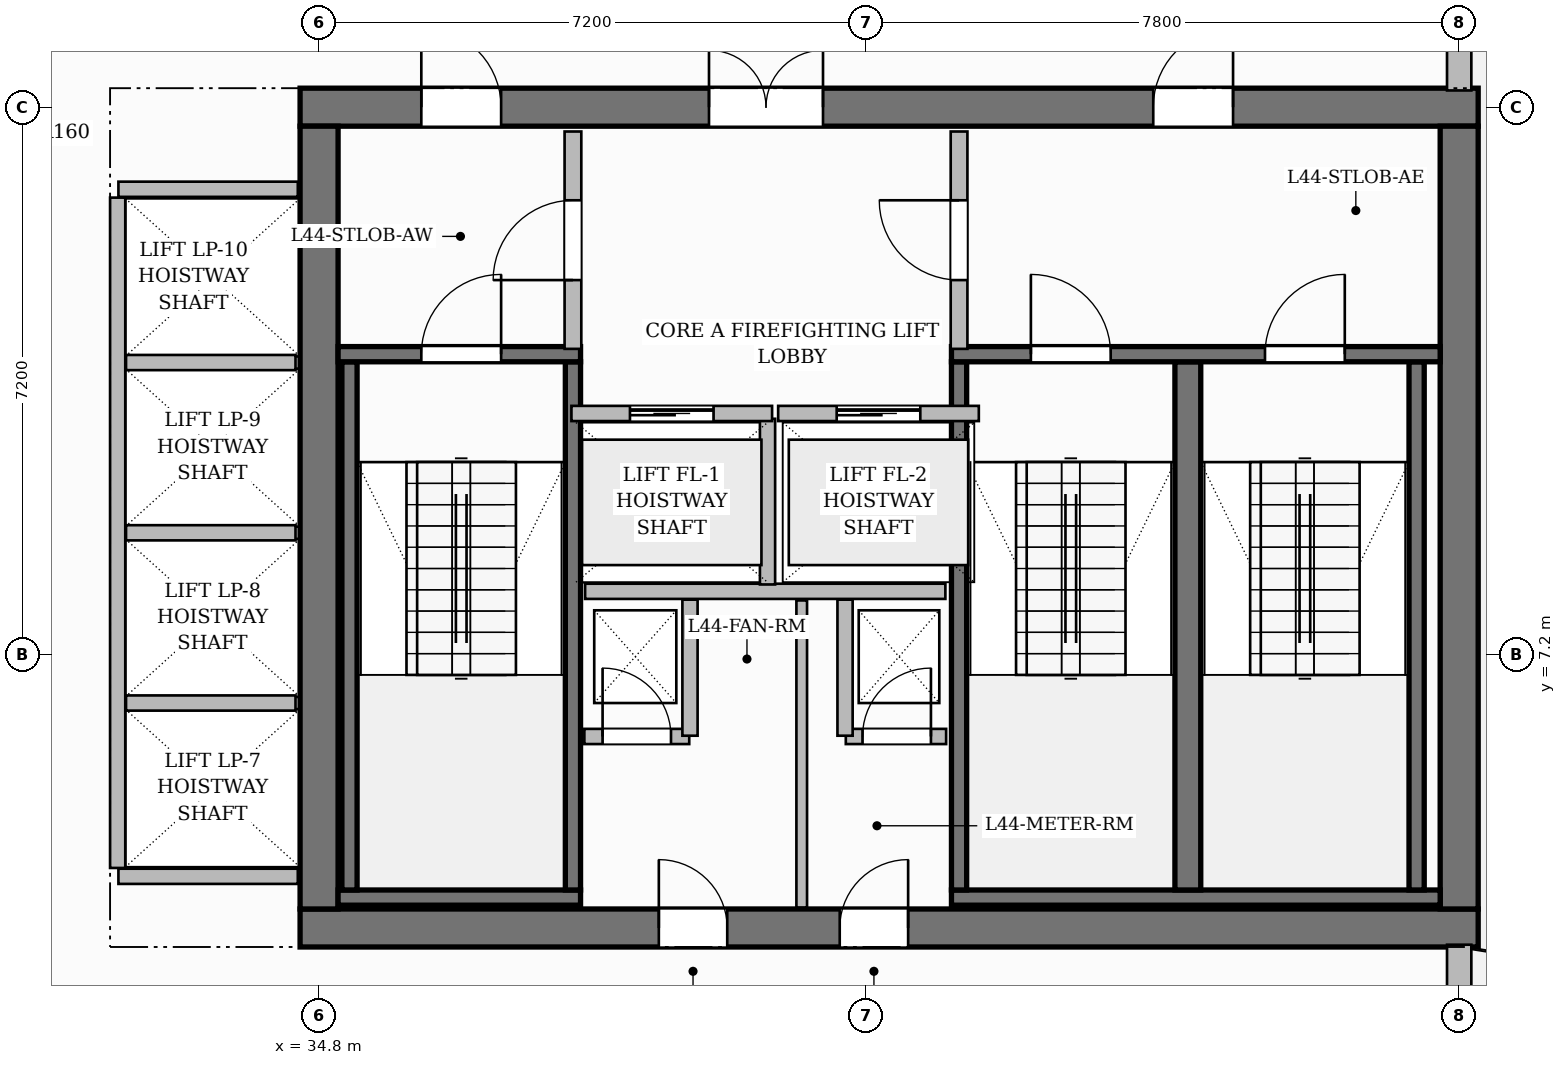
"""IFC4 building model, lengths in metres.
Left out: names, types, materials, properties, quantities, classifications, styles, units other than length and angle.
Written with IfcOpenShell. Run it as: python <this file> out.ifc"""

import sys

from ifc_helpers import new_model, si_unit, direction, frame, frame_2d, origin, place, context, subcontext, project, spatial, rectangle, extrude, source, transform, mapped, element, fill, save


model = new_model("IFC4")
c1 = context("Model", 3, precision=1e-05, world=origin(), true_north=direction((0.0, 1.0)))
c2 = subcontext(c1, "Body", "Model", "MODEL_VIEW")
j1 = project(units=[si_unit("LENGTHUNIT", "METRE"), si_unit("PLANEANGLEUNIT", "RADIAN")], contexts=[c1])
p1 = place(None, origin())
s1 = spatial("IfcSite", under=j1, at=p1, CompositionType="ELEMENT")
p2 = place(p1, origin())
s2 = spatial("IfcBuilding", under=s1, at=p2, CompositionType="ELEMENT")
p3 = place(p2, frame((0.0, 0.0, 177.25)))
s3 = spatial("IfcBuildingStorey", under=s2, at=p3, CompositionType="ELEMENT", Elevation=177.25)
p4 = place(p3, frame((34.55, 3.6, 0.0), z_axis=(0.0, 0.0, 1.0), x_axis=(1.0, 0.0, 0.0)))
e1 = element("IfcWall", 1, at=p4, inside=s3, PredefinedType="SHEAR", context=c2, shape_type="SweptSolid", body=[
    extrude(rectangle(XDim=15.5, YDim=0.5, at=frame_2d((7.75, 0.0))), origin(), (0.0, 0.0, 1.0), 3.85),
])
p5 = place(p4, frame((4.72, 0.0, 0.0)))
e2 = element("IfcOpeningElement", 2, at=p5, cuts=e1, PredefinedType="OPENING", context=c2, shape_type="SweptSolid", body=[
    extrude(rectangle(XDim=0.9, YDim=2.1, at=frame_2d((0.45, 1.05))), frame((0.0, 0.26, 0.0), z_axis=(0.0, -1.0, 0.0), x_axis=(1.0, 0.0, 0.0)), (0.0, 0.0, 1.0), 0.52),
])
p6 = place(p4, frame((7.1, 0.0, 0.0)))
e3 = element("IfcOpeningElement", 3, at=p6, cuts=e1, PredefinedType="OPENING", context=c2, shape_type="SweptSolid", body=[
    extrude(rectangle(XDim=0.9, YDim=2.1, at=frame_2d((0.45, 1.05))), frame((0.0, 0.26, 0.0), z_axis=(0.0, -1.0, 0.0), x_axis=(1.0, 0.0, 0.0)), (0.0, 0.0, 1.0), 0.52),
])
p7 = place(p3, frame((34.55, 14.4, 0.0), z_axis=(0.0, 0.0, 1.0), x_axis=(1.0, 0.0, 0.0)))
e4 = element("IfcWall", 4, at=p7, inside=s3, PredefinedType="SHEAR", context=c2, shape_type="SweptSolid", body=[
    extrude(rectangle(XDim=15.5, YDim=0.5, at=frame_2d((7.75, 0.0))), origin(), (0.0, 0.0, 1.0), 3.85),
])
p8 = place(p7, frame((5.38, 0.0, 0.0)))
e5 = element("IfcOpeningElement", 5, at=p8, cuts=e4, PredefinedType="OPENING", context=c2, shape_type="SweptSolid", body=[
    extrude(rectangle(XDim=1.5, YDim=2.2, at=frame_2d((0.75, 1.1))), frame((0.0, 0.26, 0.0), z_axis=(0.0, -1.0, 0.0), x_axis=(1.0, 0.0, 0.0)), (0.0, 0.0, 1.0), 0.52),
])
p9 = place(p7, frame((1.595, 0.0, 0.0)))
e6 = element("IfcOpeningElement", 6, at=p9, cuts=e4, PredefinedType="OPENING", context=c2, shape_type="SweptSolid", body=[
    extrude(rectangle(XDim=1.05, YDim=2.15, at=frame_2d((0.525, 1.075))), frame((0.0, 0.26, 0.0), z_axis=(0.0, -1.0, 0.0), x_axis=(1.0, 0.0, 0.0)), (0.0, 0.0, 1.0), 0.52),
])
p10 = place(p7, frame((11.225, 0.0, 0.0)))
e7 = element("IfcOpeningElement", 7, at=p10, cuts=e4, PredefinedType="OPENING", context=c2, shape_type="SweptSolid", body=[
    extrude(rectangle(XDim=1.05, YDim=2.15, at=frame_2d((0.525, 1.075))), frame((0.0, 0.26, 0.0), z_axis=(0.0, -1.0, 0.0), x_axis=(1.0, 0.0, 0.0)), (0.0, 0.0, 1.0), 0.52),
])
for number, where, z_axis, x_axis in (
    (8, (34.8, 3.85, 0.0), (0.0, 0.0, 1.0), (0.0, 1.0, 0.0)),
    (9, (49.8, 3.85, 0.0), (0.0, 0.0, 1.0), (0.0, 1.0, 0.0)),
):
    element("IfcWall", number, at=place(p3, frame(where, z_axis=z_axis, x_axis=x_axis)), inside=s3, PredefinedType="SHEAR", context=c2, shape_type="SweptSolid", body=[
        extrude(rectangle(XDim=10.3, YDim=0.5, at=frame_2d((5.15, 0.0))), origin(), (0.0, 0.0, 1.0), 3.85),
    ])
p11 = place(p3, frame((35.05, 4.0, 0.0), z_axis=(0.0, 0.0, 1.0), x_axis=(1.0, 0.0, 0.0)))
e10 = element("IfcWall", 10, at=p11, inside=s3, PredefinedType="SHEAR", context=c2, shape_type="SweptSolid", body=[
    extrude(rectangle(XDim=3.19, YDim=0.2, at=frame_2d((1.595, 0.0))), origin(), (0.0, 0.0, 1.0), 3.85),
])
for number, where, z_axis, x_axis in (
    (11, (35.2, 4.1, 0.0), (0.0, 0.0, 1.0), (0.0, 1.0, 0.0)),
    (12, (38.14, 4.1, 0.0), (0.0, 0.0, 1.0), (0.0, 1.0, 0.0)),
):
    element("IfcWall", number, at=place(p3, frame(where, z_axis=z_axis, x_axis=x_axis)), inside=s3, PredefinedType="SHEAR", context=c2, shape_type="SweptSolid", body=[
        extrude(rectangle(XDim=6.95, YDim=0.2, at=frame_2d((3.475, 0.0))), origin(), (0.0, 0.0, 1.0), 3.85),
    ])
p12 = place(p3, frame((35.05, 11.15, 0.0), z_axis=(0.0, 0.0, 1.0), x_axis=(1.0, 0.0, 0.0)))
e13 = element("IfcWall", 13, at=p12, inside=s3, PredefinedType="SHEAR", context=c2, shape_type="SweptSolid", body=[
    extrude(rectangle(XDim=3.19, YDim=0.2, at=frame_2d((1.595, 0.0))), origin(), (0.0, 0.0, 1.0), 3.85),
])
p13 = place(p12, frame((1.095, 0.0, 0.0)))
e14 = element("IfcOpeningElement", 14, at=p13, cuts=e13, PredefinedType="OPENING", context=c2, shape_type="SweptSolid", body=[
    extrude(rectangle(XDim=1.05, YDim=2.2, at=frame_2d((0.525, 1.1))), frame((0.0, 0.11, 0.0), z_axis=(0.0, -1.0, 0.0), x_axis=(1.0, 0.0, 0.0)), (0.0, 0.0, 1.0), 0.22),
])
p14 = place(p3, frame((43.12, 4.0, 0.0), z_axis=(0.0, 0.0, 1.0), x_axis=(1.0, 0.0, 0.0)))
e15 = element("IfcWall", 15, at=p14, inside=s3, PredefinedType="SHEAR", context=c2, shape_type="SweptSolid", body=[
    extrude(rectangle(XDim=6.43, YDim=0.2, at=frame_2d((3.215, 0.0))), origin(), (0.0, 0.0, 1.0), 3.85),
])
p15 = place(p3, frame((43.22, 4.1, 0.0), z_axis=(0.0, 0.0, 1.0), x_axis=(0.0, 1.0, 0.0)))
e16 = element("IfcWall", 16, at=p15, inside=s3, PredefinedType="SHEAR", context=c2, shape_type="SweptSolid", body=[
    extrude(rectangle(XDim=6.95, YDim=0.2, at=frame_2d((3.475, 0.0))), origin(), (0.0, 0.0, 1.0), 3.85),
])
p16 = place(p3, frame((46.23, 4.1, 0.0), z_axis=(0.0, 0.0, 1.0), x_axis=(0.0, 1.0, 0.0)))
e17 = element("IfcWall", 17, at=p16, inside=s3, PredefinedType="SHEAR", context=c2, shape_type="SweptSolid", body=[
    extrude(rectangle(XDim=6.95, YDim=0.34, at=frame_2d((3.475, 0.0))), origin(), (0.0, 0.0, 1.0), 3.85),
])
p17 = place(p3, frame((49.24, 4.1, 0.0), z_axis=(0.0, 0.0, 1.0), x_axis=(0.0, 1.0, 0.0)))
e18 = element("IfcWall", 18, at=p17, inside=s3, PredefinedType="SHEAR", context=c2, shape_type="SweptSolid", body=[
    extrude(rectangle(XDim=6.95, YDim=0.2, at=frame_2d((3.475, 0.0))), origin(), (0.0, 0.0, 1.0), 3.85),
])
p18 = place(p3, frame((43.12, 11.15, 0.0), z_axis=(0.0, 0.0, 1.0), x_axis=(1.0, 0.0, 0.0)))
e19 = element("IfcWall", 19, at=p18, inside=s3, PredefinedType="SHEAR", context=c2, shape_type="SweptSolid", body=[
    extrude(rectangle(XDim=6.43, YDim=0.2, at=frame_2d((3.215, 0.0))), origin(), (0.0, 0.0, 1.0), 3.85),
])
p19 = place(p18, frame((1.045, 0.0, 0.0)))
e20 = element("IfcOpeningElement", 20, at=p19, cuts=e19, PredefinedType="OPENING", context=c2, shape_type="SweptSolid", body=[
    extrude(rectangle(XDim=1.05, YDim=2.2, at=frame_2d((0.525, 1.1))), frame((0.0, 0.11, 0.0), z_axis=(0.0, -1.0, 0.0), x_axis=(1.0, 0.0, 0.0)), (0.0, 0.0, 1.0), 0.22),
])
p20 = place(p18, frame((4.125, 0.0, 0.0)))
e21 = element("IfcOpeningElement", 21, at=p20, cuts=e19, PredefinedType="OPENING", context=c2, shape_type="SweptSolid", body=[
    extrude(rectangle(XDim=1.05, YDim=2.2, at=frame_2d((0.525, 1.1))), frame((0.0, 0.11, 0.0), z_axis=(0.0, -1.0, 0.0), x_axis=(1.0, 0.0, 0.0)), (0.0, 0.0, 1.0), 0.22),
])
p21 = place(p3, frame((38.3, 8.03, 0.0), z_axis=(0.0, 0.0, 1.0), x_axis=(1.0, 0.0, 0.0)))
e22 = element("IfcWall", 22, at=p21, inside=s3, PredefinedType="PARTITIONING", context=c2, shape_type="SweptSolid", body=[
    extrude(rectangle(XDim=4.74, YDim=0.2, at=frame_2d((2.37, 0.0))), origin(), (0.0, 0.0, 1.0), 3.6),
])
p22 = place(p3, frame((40.7, 8.12, 0.0), z_axis=(0.0, 0.0, 1.0), x_axis=(0.0, 1.0, 0.0)))
e23 = element("IfcWall", 23, at=p22, inside=s3, PredefinedType="PARTITIONING", context=c2, shape_type="SweptSolid", body=[
    extrude(rectangle(XDim=2.18, YDim=0.2, at=frame_2d((1.09, 0.0))), origin(), (0.0, 0.0, 1.0), 3.6),
])
p23 = place(p3, frame((38.14, 11.22, 0.0), z_axis=(0.0, 0.0, 1.0), x_axis=(0.0, 1.0, 0.0)))
e24 = element("IfcWall", 24, at=p23, inside=s3, PredefinedType="PARTITIONING", context=c2, shape_type="SweptSolid", body=[
    extrude(rectangle(XDim=2.86, YDim=0.22, at=frame_2d((1.43, 0.0))), origin(), (0.0, 0.0, 1.0), 3.6),
])
p24 = place(p23, frame((0.905, 0.0, 0.0)))
e25 = element("IfcOpeningElement", 25, at=p24, cuts=e24, PredefinedType="OPENING", context=c2, shape_type="SweptSolid", body=[
    extrude(rectangle(XDim=1.05, YDim=2.15, at=frame_2d((0.525, 1.075))), frame((0.0, 0.12, 0.0), z_axis=(0.0, -1.0, 0.0), x_axis=(1.0, 0.0, 0.0)), (0.0, 0.0, 1.0), 0.24),
])
p25 = place(p3, frame((43.22, 11.22, 0.0), z_axis=(0.0, 0.0, 1.0), x_axis=(0.0, 1.0, 0.0)))
e26 = element("IfcWall", 26, at=p25, inside=s3, PredefinedType="PARTITIONING", context=c2, shape_type="SweptSolid", body=[
    extrude(rectangle(XDim=2.86, YDim=0.22, at=frame_2d((1.43, 0.0))), origin(), (0.0, 0.0, 1.0), 3.6),
])
p26 = place(p25, frame((0.905, 0.0, 0.0)))
e27 = element("IfcOpeningElement", 27, at=p26, cuts=e26, PredefinedType="OPENING", context=c2, shape_type="SweptSolid", body=[
    extrude(rectangle(XDim=1.05, YDim=2.15, at=frame_2d((0.525, 1.075))), frame((0.0, 0.12, 0.0), z_axis=(0.0, -1.0, 0.0), x_axis=(1.0, 0.0, 0.0)), (0.0, 0.0, 1.0), 0.24),
])
p27 = place(p3, frame((38.29, 6.12, 0.0), z_axis=(0.0, 0.0, 1.0), x_axis=(1.0, 0.0, 0.0)))
e28 = element("IfcWall", 28, at=p27, inside=s3, PredefinedType="PARTITIONING", context=c2, shape_type="SweptSolid", body=[
    extrude(rectangle(XDim=1.38, YDim=0.2, at=frame_2d((0.69, 0.0))), origin(), (0.0, 0.0, 1.0), 3.6),
])
p28 = place(p27, frame((0.24, 0.0, 0.0)))
e29 = element("IfcOpeningElement", 29, at=p28, cuts=e28, PredefinedType="OPENING", context=c2, shape_type="SweptSolid", body=[
    extrude(rectangle(XDim=0.9, YDim=2.1, at=frame_2d((0.45, 1.05))), frame((0.0, 0.11, 0.0), z_axis=(0.0, -1.0, 0.0), x_axis=(1.0, 0.0, 0.0)), (0.0, 0.0, 1.0), 0.22),
])
p29 = place(p3, frame((39.68, 6.13, 0.0), z_axis=(0.0, 0.0, 1.0), x_axis=(0.0, 1.0, 0.0)))
e30 = element("IfcWall", 30, at=p29, inside=s3, PredefinedType="PARTITIONING", context=c2, shape_type="SweptSolid", body=[
    extrude(rectangle(XDim=1.79, YDim=0.2, at=frame_2d((0.895, 0.0))), origin(), (0.0, 0.0, 1.0), 3.6),
])
p30 = place(p3, frame((41.73, 6.12, 0.0), z_axis=(0.0, 0.0, 1.0), x_axis=(1.0, 0.0, 0.0)))
e31 = element("IfcWall", 31, at=p30, inside=s3, PredefinedType="PARTITIONING", context=c2, shape_type="SweptSolid", body=[
    extrude(rectangle(XDim=1.32, YDim=0.2, at=frame_2d((0.66, 0.0))), origin(), (0.0, 0.0, 1.0), 3.6),
])
p31 = place(p30, frame((0.22, 0.0, 0.0)))
e32 = element("IfcOpeningElement", 32, at=p31, cuts=e31, PredefinedType="OPENING", context=c2, shape_type="SweptSolid", body=[
    extrude(rectangle(XDim=0.9, YDim=2.1, at=frame_2d((0.45, 1.05))), frame((0.0, 0.11, 0.0), z_axis=(0.0, -1.0, 0.0), x_axis=(1.0, 0.0, 0.0)), (0.0, 0.0, 1.0), 0.22),
])
p32 = place(p3, frame((41.72, 6.13, 0.0), z_axis=(0.0, 0.0, 1.0), x_axis=(0.0, 1.0, 0.0)))
e33 = element("IfcWall", 33, at=p32, inside=s3, PredefinedType="PARTITIONING", context=c2, shape_type="SweptSolid", body=[
    extrude(rectangle(XDim=1.79, YDim=0.2, at=frame_2d((0.895, 0.0))), origin(), (0.0, 0.0, 1.0), 3.6),
])
p33 = place(p3, frame((41.15, 3.87, 0.0), z_axis=(0.0, 0.0, 1.0), x_axis=(0.0, 1.0, 0.0)))
e34 = element("IfcWall", 34, at=p33, inside=s3, PredefinedType="PARTITIONING", context=c2, shape_type="SweptSolid", body=[
    extrude(rectangle(XDim=4.04, YDim=0.14, at=frame_2d((2.02, 0.0))), origin(), (0.0, 0.0, 1.0), 3.6),
])
for number, where, z_axis, x_axis in (
    (35, (32.16, 4.28, 0.0), (0.0, 0.0, 1.0), (1.0, 0.0, 0.0)),
    (36, (32.16, 13.32, 0.0), (0.0, 0.0, 1.0), (1.0, 0.0, 0.0)),
):
    element("IfcWall", number, at=place(p3, frame(where, z_axis=z_axis, x_axis=x_axis)), inside=s3, PredefinedType="PARTITIONING", context=c2, shape_type="SweptSolid", body=[
        extrude(rectangle(XDim=2.36, YDim=0.2, at=frame_2d((1.18, 0.0))), origin(), (0.0, 0.0, 1.0), 3.6),
    ])
p34 = place(p3, frame((32.15, 4.39, 0.0), z_axis=(0.0, 0.0, 1.0), x_axis=(0.0, 1.0, 0.0)))
e37 = element("IfcWall", 37, at=p34, inside=s3, PredefinedType="PARTITIONING", context=c2, shape_type="SweptSolid", body=[
    extrude(rectangle(XDim=8.82, YDim=0.2, at=frame_2d((4.41, 0.0))), origin(), (0.0, 0.0, 1.0), 3.6),
])
for number, where, z_axis, x_axis in (
    (38, (32.26, 6.56, 0.0), (0.0, 0.0, 1.0), (1.0, 0.0, 0.0)),
    (39, (32.26, 8.8, 0.0), (0.0, 0.0, 1.0), (1.0, 0.0, 0.0)),
    (40, (32.26, 11.04, 0.0), (0.0, 0.0, 1.0), (1.0, 0.0, 0.0)),
):
    element("IfcWall", number, at=place(p3, frame(where, z_axis=z_axis, x_axis=x_axis)), inside=s3, PredefinedType="PARTITIONING", context=c2, shape_type="SweptSolid", body=[
        extrude(rectangle(XDim=2.23, YDim=0.2, at=frame_2d((1.115, 0.0))), origin(), (0.0, 0.0, 1.0), 3.6),
    ])
p35 = place(p3, frame((38.12, 10.37, 0.0), z_axis=(0.0, 0.0, 1.0), x_axis=(1.0, 0.0, 0.0)))
e41 = element("IfcWall", 41, at=p35, inside=s3, PredefinedType="PARTITIONING", context=c2, shape_type="SweptSolid", body=[
    extrude(rectangle(XDim=2.64, YDim=0.2, at=frame_2d((1.32, 0.0))), origin(), (0.0, 0.0, 1.0), 3.6),
])
p36 = place(p35, frame((0.77, 0.0, 0.0)))
e42 = element("IfcOpeningElement", 42, at=p36, cuts=e41, PredefinedType="OPENING", context=c2, shape_type="SweptSolid", body=[
    extrude(rectangle(XDim=1.1, YDim=2.2, at=frame_2d((0.55, 1.1))), frame((0.0, 0.11, 0.0), z_axis=(0.0, -1.0, 0.0), x_axis=(1.0, 0.0, 0.0)), (0.0, 0.0, 1.0), 0.22),
])
p37 = place(p3, frame((40.84, 10.37, 0.0), z_axis=(0.0, 0.0, 1.0), x_axis=(1.0, 0.0, 0.0)))
e43 = element("IfcWall", 43, at=p37, inside=s3, PredefinedType="PARTITIONING", context=c2, shape_type="SweptSolid", body=[
    extrude(rectangle(XDim=2.64, YDim=0.2, at=frame_2d((1.32, 0.0))), origin(), (0.0, 0.0, 1.0), 3.6),
])
p38 = place(p37, frame((0.77, 0.0, 0.0)))
e44 = element("IfcOpeningElement", 44, at=p38, cuts=e43, PredefinedType="OPENING", context=c2, shape_type="SweptSolid", body=[
    extrude(rectangle(XDim=1.1, YDim=2.2, at=frame_2d((0.55, 1.1))), frame((0.0, 0.11, 0.0), z_axis=(0.0, -1.0, 0.0), x_axis=(1.0, 0.0, 0.0)), (0.0, 0.0, 1.0), 0.22),
])
p39 = place(p3, frame((49.8, 0.05, 0.0), z_axis=(0.0, 0.0, 1.0), x_axis=(0.0, 1.0, 0.0)))
e45 = element("IfcWall", 45, at=p39, inside=s3, PredefinedType="SOLIDWALL", context=c2, shape_type="SweptSolid", body=[
    extrude(rectangle(XDim=3.33, YDim=0.32, at=frame_2d((1.665, 0.0))), origin(), (0.0, 0.0, 1.0), 3.6),
])
p40 = place(p3, frame((49.8, 14.62, 0.0), z_axis=(0.0, 0.0, 1.0), x_axis=(0.0, 1.0, 0.0)))
e46 = element("IfcWall", 46, at=p40, inside=s3, PredefinedType="SOLIDWALL", context=c2, shape_type="SweptSolid", body=[
    extrude(rectangle(XDim=6.93, YDim=0.32, at=frame_2d((3.465, 0.0))), origin(), (0.0, 0.0, 1.0), 3.085),
])
p41 = place(p40, frame((1.889, 0.0, 0.0)))
e47 = element("IfcOpeningElement", 47, at=p41, cuts=e46, PredefinedType="OPENING", context=c2, shape_type="SweptSolid", body=[
    extrude(rectangle(XDim=1.2, YDim=2.2, at=frame_2d((0.6, 1.1))), frame((0.0, 0.17, 0.0), z_axis=(0.0, -1.0, 0.0), x_axis=(1.0, 0.0, 0.0)), (0.0, 0.0, 1.0), 0.34),
])
p42 = place(p40, frame((3.884, 0.0, 0.8)))
e48 = element("IfcOpeningElement", 48, at=p42, cuts=e46, PredefinedType="OPENING", context=c2, shape_type="SweptSolid", body=[
    extrude(rectangle(XDim=1.8, YDim=1.85, at=frame_2d((0.9, 0.925))), frame((0.0, 0.17, 0.0), z_axis=(0.0, -1.0, 0.0), x_axis=(1.0, 0.0, 0.0)), (0.0, 0.0, 1.0), 0.34),
])
m1 = source(origin(), c2, "Body", "SweptSolid", [
    extrude(rectangle(XDim=1.05, YDim=2.2, at=frame_2d((0.525, 1.1))), frame((0.0, 0.025, 0.0), z_axis=(0.0, -1.0, 0.0), x_axis=(1.0, 0.0, 0.0)), (0.0, 0.0, 1.0), 0.05),
])
p43 = place(p13, origin())
e49 = element("IfcDoor", 49, at=p43, inside=s3, OperationType="SINGLE_SWING_RIGHT", PredefinedType="DOOR", context=c2, shape_type="MappedRepresentation", body=[
    mapped(m1, transform((0.0, 0.0, 0.0), scale=1.0)),
])
fill(e14, e49)
p44 = place(p19, origin())
e50 = element("IfcDoor", 50, at=p44, inside=s3, OperationType="SINGLE_SWING_LEFT", PredefinedType="DOOR", context=c2, shape_type="MappedRepresentation", body=[
    mapped(m1, transform((0.0, 0.0, 0.0), scale=1.0)),
])
fill(e20, e50)
p45 = place(p20, origin())
e51 = element("IfcDoor", 51, at=p45, inside=s3, OperationType="SINGLE_SWING_RIGHT", PredefinedType="DOOR", context=c2, shape_type="MappedRepresentation", body=[
    mapped(m1, transform((0.0, 0.0, 0.0), scale=1.0)),
])
fill(e21, e51)
m2 = source(origin(), c2, "Body", "SweptSolid", [
    extrude(rectangle(XDim=1.05, YDim=2.15, at=frame_2d((0.525, 1.075))), frame((0.0, 0.025, 0.0), z_axis=(0.0, -1.0, 0.0), x_axis=(1.0, 0.0, 0.0)), (0.0, 0.0, 1.0), 0.05),
])
p46 = place(p24, origin())
e52 = element("IfcDoor", 52, at=p46, inside=s3, OperationType="SINGLE_SWING_LEFT", PredefinedType="DOOR", context=c2, shape_type="MappedRepresentation", body=[
    mapped(m2, transform((0.0, 0.0, 0.0), scale=1.0)),
])
fill(e25, e52)
p47 = place(p26, origin())
e53 = element("IfcDoor", 53, at=p47, inside=s3, OperationType="SINGLE_SWING_RIGHT", PredefinedType="DOOR", context=c2, shape_type="MappedRepresentation", body=[
    mapped(m2, transform((0.0, 0.0, 0.0), scale=1.0)),
])
fill(e27, e53)
m3 = source(origin(), c2, "Body", "SweptSolid", [
    extrude(rectangle(XDim=1.5, YDim=2.2, at=frame_2d((0.75, 1.1))), frame((0.0, 0.025, 0.0), z_axis=(0.0, -1.0, 0.0), x_axis=(1.0, 0.0, 0.0)), (0.0, 0.0, 1.0), 0.05),
])
p48 = place(p8, origin())
e54 = element("IfcDoor", 54, at=p48, inside=s3, OperationType="DOUBLE_DOOR_SINGLE_SWING", PredefinedType="DOOR", context=c2, shape_type="MappedRepresentation", body=[
    mapped(m3, transform((0.0, 0.0, 0.0), scale=1.0)),
])
fill(e5, e54)
p49 = place(p9, origin())
e55 = element("IfcDoor", 55, at=p49, inside=s3, OperationType="SINGLE_SWING_LEFT", PredefinedType="DOOR", context=c2, shape_type="MappedRepresentation", body=[
    mapped(m2, transform((0.0, 0.0, 0.0), scale=1.0)),
])
fill(e6, e55)
p50 = place(p10, origin())
e56 = element("IfcDoor", 56, at=p50, inside=s3, OperationType="SINGLE_SWING_RIGHT", PredefinedType="DOOR", context=c2, shape_type="MappedRepresentation", body=[
    mapped(m2, transform((0.0, 0.0, 0.0), scale=1.0)),
])
fill(e7, e56)
m4 = source(origin(), c2, "Body", "SweptSolid", [
    extrude(rectangle(XDim=0.9, YDim=2.1, at=frame_2d((0.45, 1.05))), frame((0.0, 0.025, 0.0), z_axis=(0.0, -1.0, 0.0), x_axis=(1.0, 0.0, 0.0)), (0.0, 0.0, 1.0), 0.05),
])
p51 = place(p28, origin())
e57 = element("IfcDoor", 57, at=p51, inside=s3, OperationType="SINGLE_SWING_LEFT", PredefinedType="DOOR", context=c2, shape_type="MappedRepresentation", body=[
    mapped(m4, transform((0.0, 0.0, 0.0), scale=1.0)),
])
fill(e29, e57)
p52 = place(p31, origin())
e58 = element("IfcDoor", 58, at=p52, inside=s3, OperationType="SINGLE_SWING_RIGHT", PredefinedType="DOOR", context=c2, shape_type="MappedRepresentation", body=[
    mapped(m4, transform((0.0, 0.0, 0.0), scale=1.0)),
])
fill(e32, e58)
p53 = place(p5, origin())
e59 = element("IfcDoor", 59, at=p53, inside=s3, OperationType="SINGLE_SWING_LEFT", PredefinedType="DOOR", context=c2, shape_type="MappedRepresentation", body=[
    mapped(m4, transform((0.0, 0.0, 0.0), scale=1.0)),
])
fill(e2, e59)
p54 = place(p6, origin())
e60 = element("IfcDoor", 60, at=p54, inside=s3, OperationType="SINGLE_SWING_RIGHT", PredefinedType="DOOR", context=c2, shape_type="MappedRepresentation", body=[
    mapped(m4, transform((0.0, 0.0, 0.0), scale=1.0)),
])
fill(e3, e60)
m5 = source(origin(), c2, "Body", "SweptSolid", [
    extrude(rectangle(XDim=1.1, YDim=2.2, at=frame_2d((0.55, 1.1))), frame((0.0, 0.025, 0.0), z_axis=(0.0, -1.0, 0.0), x_axis=(1.0, 0.0, 0.0)), (0.0, 0.0, 1.0), 0.05),
])
p55 = place(p36, origin())
e61 = element("IfcDoor", 61, at=p55, inside=s3, OperationType="SLIDING_TO_LEFT", PredefinedType="DOOR", context=c2, shape_type="MappedRepresentation", body=[
    mapped(m5, transform((0.0, 0.0, 0.0), scale=1.0)),
])
fill(e42, e61)
p56 = place(p38, origin())
e62 = element("IfcDoor", 62, at=p56, inside=s3, OperationType="SLIDING_TO_LEFT", PredefinedType="DOOR", context=c2, shape_type="MappedRepresentation", body=[
    mapped(m5, transform((0.0, 0.0, 0.0), scale=1.0)),
])
fill(e44, e62)
save(model, sys.argv[1])
